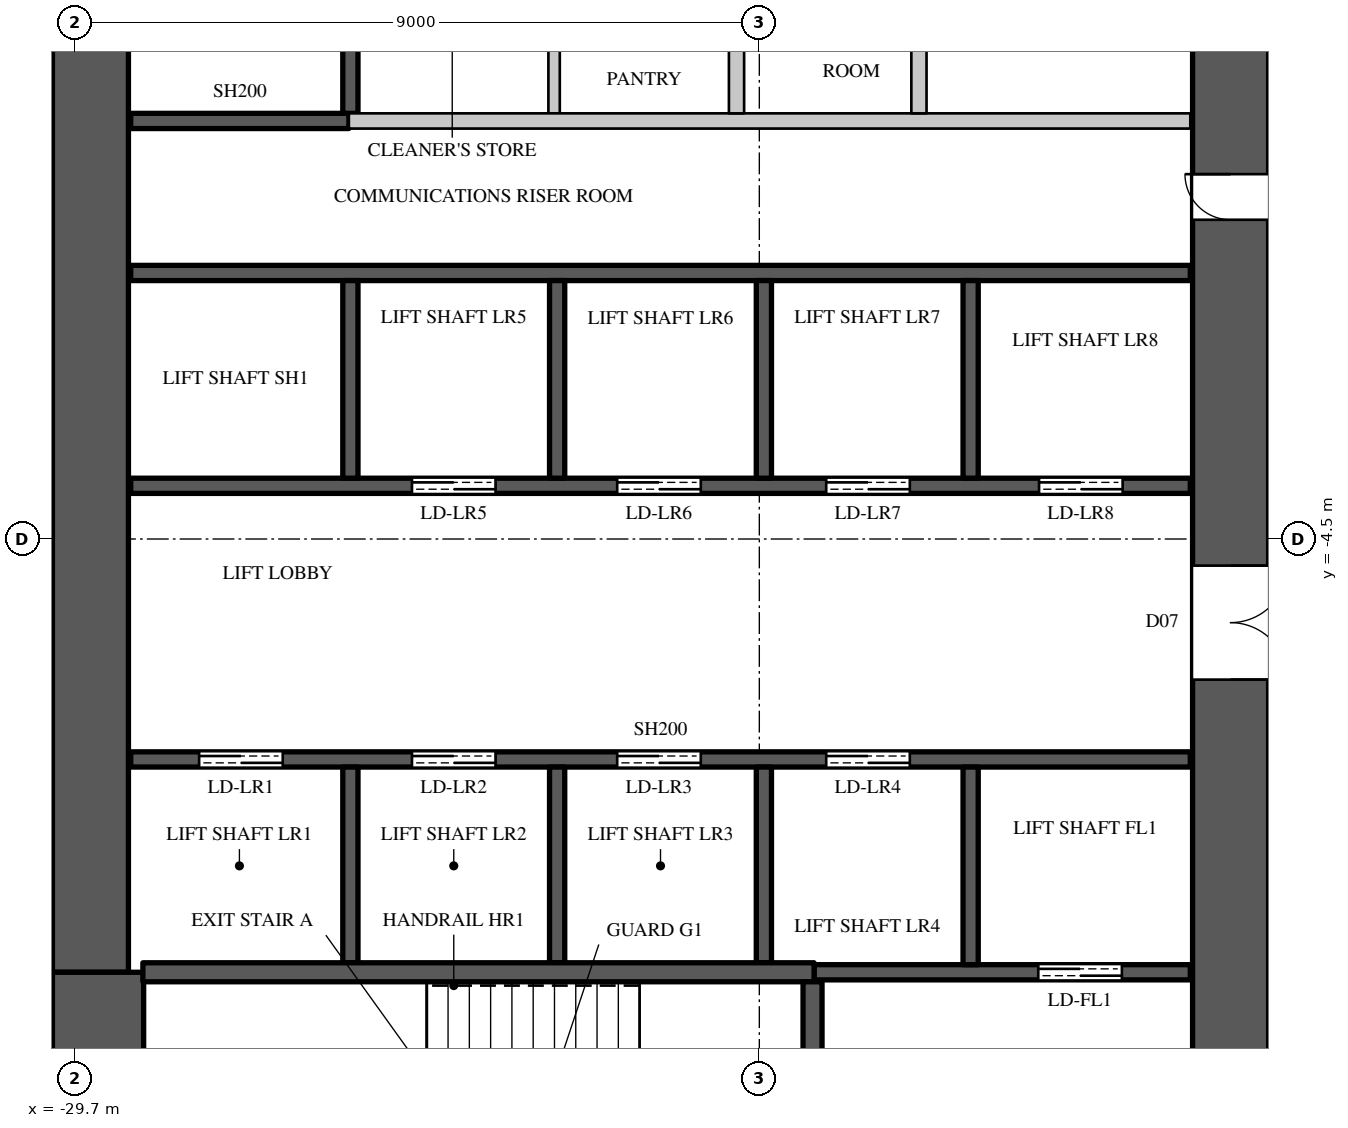
"""IFC4 building model, lengths in metres.
Left out: names, types, materials, properties, quantities, classifications, styles, units other than length and angle.
Written with IfcOpenShell. Run it as: python <this file> out.ifc"""

import sys

from ifc_helpers import new_model, si_unit, direction, frame, frame_2d, origin, place, context, subcontext, project, spatial, rectangle, extrude, element, fill, save


model = new_model("IFC4")
c1 = context("Model", 3, precision=1e-05, world=origin(), true_north=direction((0.0, 1.0)))
c2 = subcontext(c1, "Body", "Model", "MODEL_VIEW")
j1 = project(units=[si_unit("LENGTHUNIT", "METRE"), si_unit("PLANEANGLEUNIT", "RADIAN")], contexts=[c1])
p1 = place(None, origin())
s1 = spatial("IfcSite", under=j1, at=p1, CompositionType="ELEMENT")
p2 = place(p1, origin())
s2 = spatial("IfcBuilding", under=s1, at=p2, CompositionType="ELEMENT")
p3 = place(p2, frame((0.0, 0.0, 77.1)))
s3 = spatial("IfcBuildingStorey", under=s2, at=p3, CompositionType="ELEMENT", Elevation=77.1)
p4 = place(p3, frame((-14.5, -14.8, 0.0), z_axis=(0.0, 0.0, 1.0), x_axis=(0.0, 1.0, 0.0)))
e1 = element("IfcWall", 1, at=p4, inside=s3, PredefinedType="SHEAR", context=c2, shape_type="SweptSolid", body=[
    extrude(rectangle(XDim=29.6, YDim=1.0, at=frame_2d((14.8, 0.0))), origin(), (0.0, 0.0, 1.0), 3.6),
])
p5 = place(p4, frame((8.45, 0.0, 0.0)))
e2 = element("IfcOpeningElement", 2, at=p5, cuts=e1, PredefinedType="OPENING", context=c2, shape_type="SweptSolid", body=[
    extrude(rectangle(XDim=1.5, YDim=2.4, at=frame_2d((0.75, 1.2))), frame((0.0, 0.51, 0.0), z_axis=(0.0, -1.0, 0.0), x_axis=(1.0, 0.0, 0.0)), (0.0, 0.0, 1.0), 1.02),
])
p6 = place(p4, frame((19.65, 0.0, 0.0)))
e3 = element("IfcOpeningElement", 3, at=p6, cuts=e1, PredefinedType="OPENING", context=c2, shape_type="SweptSolid", body=[
    extrude(rectangle(XDim=1.5, YDim=2.4, at=frame_2d((0.75, 1.2))), frame((0.0, 0.51, 0.0), z_axis=(0.0, -1.0, 0.0), x_axis=(1.0, 0.0, 0.0)), (0.0, 0.0, 1.0), 1.02),
])
p7 = place(p4, frame((14.5, 0.0, 0.0)))
e4 = element("IfcOpeningElement", 4, at=p7, cuts=e1, PredefinedType="OPENING", context=c2, shape_type="SweptSolid", body=[
    extrude(rectangle(XDim=0.6, YDim=2.0, at=frame_2d((0.3, 1.0))), frame((0.0, 0.51, 0.0), z_axis=(0.0, -1.0, 0.0), x_axis=(1.0, 0.0, 0.0)), (0.0, 0.0, 1.0), 1.02),
])
p8 = place(p3, frame((-29.5, -10.2, 0.0), z_axis=(0.0, 0.0, 1.0), x_axis=(0.0, 1.0, 0.0)))
e5 = element("IfcWall", 5, at=p8, inside=s3, PredefinedType="SHEAR", context=c2, shape_type="SweptSolid", body=[
    extrude(rectangle(XDim=20.4, YDim=1.0, at=frame_2d((10.2, 0.0))), origin(), (0.0, 0.0, 1.0), 3.6),
])
p9 = place(p3, frame((-29.4, -14.8, 0.0), z_axis=(0.0, 0.0, 1.0), x_axis=(0.0, 1.0, 0.0)))
e6 = element("IfcWall", 6, at=p9, inside=s3, PredefinedType="SHEAR", context=c2, shape_type="SweptSolid", body=[
    extrude(rectangle(XDim=4.6, YDim=1.2, at=frame_2d((2.3, 0.0))), origin(), (0.0, 0.0, 1.0), 3.6),
])
p10 = place(p3, frame((-23.4, 1.1, 0.0), z_axis=(0.0, 0.0, 1.0), x_axis=(0.0, 1.0, 0.0)))
e7 = element("IfcWall", 7, at=p10, inside=s3, PredefinedType="PARTITIONING", context=c2, shape_type="SweptSolid", body=[
    extrude(rectangle(XDim=2.6, YDim=0.15, at=frame_2d((1.3, 0.0))), origin(), (0.0, 0.0, 1.0), 3.3),
])
p11 = place(p3, frame((-26.1, 1.0, 0.0), z_axis=(0.0, 0.0, 1.0), x_axis=(1.0, 0.0, 0.0)))
e8 = element("IfcWall", 8, at=p11, inside=s3, PredefinedType="PARTITIONING", context=c2, shape_type="SweptSolid", body=[
    extrude(rectangle(XDim=11.07, YDim=0.2, at=frame_2d((5.535, 0.0))), origin(), (0.0, 0.0, 1.0), 3.3),
])
for number, where, z_axis, x_axis in (
    (9, (-21.0, 1.1, 0.0), (0.0, 0.0, 1.0), (0.0, 1.0, 0.0)),
    (10, (-18.6, 1.1, 0.0), (0.0, 0.0, 1.0), (0.0, 1.0, 0.0)),
):
    element("IfcWall", number, at=place(p3, frame(where, z_axis=z_axis, x_axis=x_axis)), inside=s3, PredefinedType="PARTITIONING", context=c2, shape_type="SweptSolid", body=[
        extrude(rectangle(XDim=2.6, YDim=0.2, at=frame_2d((1.3, 0.0))), origin(), (0.0, 0.0, 1.0), 3.3),
    ])
p12 = place(p3, frame((-28.97, -7.4, 0.0), z_axis=(0.0, 0.0, 1.0), x_axis=(1.0, 0.0, 0.0)))
e11 = element("IfcWall", 11, at=p12, inside=s3, PredefinedType="SHEAR", context=c2, shape_type="SweptSolid", body=[
    extrude(rectangle(XDim=13.94, YDim=0.2, at=frame_2d((6.97, 0.0))), origin(), (0.0, 0.0, 1.0), 3.3),
])
p13 = place(p12, frame((0.9, 0.0, 0.0)))
e12 = element("IfcOpeningElement", 12, at=p13, cuts=e11, PredefinedType="OPENING", context=c2, shape_type="SweptSolid", body=[
    extrude(rectangle(XDim=1.1, YDim=2.2, at=frame_2d((0.55, 1.1))), frame((0.0, 0.11, 0.0), z_axis=(0.0, -1.0, 0.0), x_axis=(1.0, 0.0, 0.0)), (0.0, 0.0, 1.0), 0.22),
])
p14 = place(p12, frame((3.7, 0.0, 0.0)))
e13 = element("IfcOpeningElement", 13, at=p14, cuts=e11, PredefinedType="OPENING", context=c2, shape_type="SweptSolid", body=[
    extrude(rectangle(XDim=1.1, YDim=2.2, at=frame_2d((0.55, 1.1))), frame((0.0, 0.11, 0.0), z_axis=(0.0, -1.0, 0.0), x_axis=(1.0, 0.0, 0.0)), (0.0, 0.0, 1.0), 0.22),
])
p15 = place(p12, frame((6.4, 0.0, 0.0)))
e14 = element("IfcOpeningElement", 14, at=p15, cuts=e11, PredefinedType="OPENING", context=c2, shape_type="SweptSolid", body=[
    extrude(rectangle(XDim=1.1, YDim=2.2, at=frame_2d((0.55, 1.1))), frame((0.0, 0.11, 0.0), z_axis=(0.0, -1.0, 0.0), x_axis=(1.0, 0.0, 0.0)), (0.0, 0.0, 1.0), 0.22),
])
p16 = place(p12, frame((9.15, 0.0, 0.0)))
e15 = element("IfcOpeningElement", 15, at=p16, cuts=e11, PredefinedType="OPENING", context=c2, shape_type="SweptSolid", body=[
    extrude(rectangle(XDim=1.1, YDim=2.2, at=frame_2d((0.55, 1.1))), frame((0.0, 0.11, 0.0), z_axis=(0.0, -1.0, 0.0), x_axis=(1.0, 0.0, 0.0)), (0.0, 0.0, 1.0), 0.22),
])
p17 = place(p3, frame((-28.97, -3.8, 0.0), z_axis=(0.0, 0.0, 1.0), x_axis=(1.0, 0.0, 0.0)))
e16 = element("IfcWall", 16, at=p17, inside=s3, PredefinedType="SHEAR", context=c2, shape_type="SweptSolid", body=[
    extrude(rectangle(XDim=13.94, YDim=0.2, at=frame_2d((6.97, 0.0))), origin(), (0.0, 0.0, 1.0), 3.3),
])
p18 = place(p17, frame((3.7, 0.0, 0.0)))
e17 = element("IfcOpeningElement", 17, at=p18, cuts=e16, PredefinedType="OPENING", context=c2, shape_type="SweptSolid", body=[
    extrude(rectangle(XDim=1.1, YDim=2.2, at=frame_2d((0.55, 1.1))), frame((0.0, 0.11, 0.0), z_axis=(0.0, -1.0, 0.0), x_axis=(1.0, 0.0, 0.0)), (0.0, 0.0, 1.0), 0.22),
])
p19 = place(p17, frame((6.4, 0.0, 0.0)))
e18 = element("IfcOpeningElement", 18, at=p19, cuts=e16, PredefinedType="OPENING", context=c2, shape_type="SweptSolid", body=[
    extrude(rectangle(XDim=1.1, YDim=2.2, at=frame_2d((0.55, 1.1))), frame((0.0, 0.11, 0.0), z_axis=(0.0, -1.0, 0.0), x_axis=(1.0, 0.0, 0.0)), (0.0, 0.0, 1.0), 0.22),
])
p20 = place(p17, frame((9.15, 0.0, 0.0)))
e19 = element("IfcOpeningElement", 19, at=p20, cuts=e16, PredefinedType="OPENING", context=c2, shape_type="SweptSolid", body=[
    extrude(rectangle(XDim=1.1, YDim=2.2, at=frame_2d((0.55, 1.1))), frame((0.0, 0.11, 0.0), z_axis=(0.0, -1.0, 0.0), x_axis=(1.0, 0.0, 0.0)), (0.0, 0.0, 1.0), 0.22),
])
p21 = place(p17, frame((11.95, 0.0, 0.0)))
e20 = element("IfcOpeningElement", 20, at=p21, cuts=e16, PredefinedType="OPENING", context=c2, shape_type="SweptSolid", body=[
    extrude(rectangle(XDim=1.1, YDim=2.2, at=frame_2d((0.55, 1.1))), frame((0.0, 0.11, 0.0), z_axis=(0.0, -1.0, 0.0), x_axis=(1.0, 0.0, 0.0)), (0.0, 0.0, 1.0), 0.22),
])
p22 = place(p3, frame((-28.97, -1.0, 0.0), z_axis=(0.0, 0.0, 1.0), x_axis=(1.0, 0.0, 0.0)))
e21 = element("IfcWall", 21, at=p22, inside=s3, PredefinedType="SHEAR", context=c2, shape_type="SweptSolid", body=[
    extrude(rectangle(XDim=13.94, YDim=0.2, at=frame_2d((6.97, 0.0))), origin(), (0.0, 0.0, 1.0), 3.3),
])
p23 = place(p3, frame((-28.97, 1.0, 0.0), z_axis=(0.0, 0.0, 1.0), x_axis=(1.0, 0.0, 0.0)))
e22 = element("IfcWall", 22, at=p23, inside=s3, PredefinedType="SHEAR", context=c2, shape_type="SweptSolid", body=[
    extrude(rectangle(XDim=2.87, YDim=0.2, at=frame_2d((1.435, 0.0))), origin(), (0.0, 0.0, 1.0), 3.3),
])
p24 = place(p3, frame((-26.08, -10.075, 0.0), z_axis=(0.0, 0.0, 1.0), x_axis=(0.0, 1.0, 0.0)))
e23 = element("IfcWall", 23, at=p24, inside=s3, PredefinedType="SHEAR", context=c2, shape_type="SweptSolid", body=[
    extrude(rectangle(XDim=2.575, YDim=0.2, at=frame_2d((1.288, 0.0))), origin(), (0.0, 0.0, 1.0), 3.6),
])
p25 = place(p3, frame((-26.08, -3.7, 0.0), z_axis=(0.0, 0.0, 1.0), x_axis=(0.0, 1.0, 0.0)))
e24 = element("IfcWall", 24, at=p25, inside=s3, PredefinedType="SHEAR", context=c2, shape_type="SweptSolid", body=[
    extrude(rectangle(XDim=2.6, YDim=0.2, at=frame_2d((1.3, 0.0))), origin(), (0.0, 0.0, 1.0), 3.6),
])
p26 = place(p3, frame((-26.08, 1.1, 0.0), z_axis=(0.0, 0.0, 1.0), x_axis=(0.0, 1.0, 0.0)))
e25 = element("IfcWall", 25, at=p26, inside=s3, PredefinedType="SHEAR", context=c2, shape_type="SweptSolid", body=[
    extrude(rectangle(XDim=2.6, YDim=0.2, at=frame_2d((1.3, 0.0))), origin(), (0.0, 0.0, 1.0), 3.3),
])
p27 = place(p3, frame((-23.36, -10.075, 0.0), z_axis=(0.0, 0.0, 1.0), x_axis=(0.0, 1.0, 0.0)))
e26 = element("IfcWall", 26, at=p27, inside=s3, PredefinedType="SHEAR", context=c2, shape_type="SweptSolid", body=[
    extrude(rectangle(XDim=2.575, YDim=0.2, at=frame_2d((1.288, 0.0))), origin(), (0.0, 0.0, 1.0), 3.6),
])
p28 = place(p3, frame((-23.36, -3.7, 0.0), z_axis=(0.0, 0.0, 1.0), x_axis=(0.0, 1.0, 0.0)))
e27 = element("IfcWall", 27, at=p28, inside=s3, PredefinedType="SHEAR", context=c2, shape_type="SweptSolid", body=[
    extrude(rectangle(XDim=2.6, YDim=0.2, at=frame_2d((1.3, 0.0))), origin(), (0.0, 0.0, 1.0), 3.6),
])
p29 = place(p3, frame((-20.64, -10.075, 0.0), z_axis=(0.0, 0.0, 1.0), x_axis=(0.0, 1.0, 0.0)))
e28 = element("IfcWall", 28, at=p29, inside=s3, PredefinedType="SHEAR", context=c2, shape_type="SweptSolid", body=[
    extrude(rectangle(XDim=2.575, YDim=0.2, at=frame_2d((1.288, 0.0))), origin(), (0.0, 0.0, 1.0), 3.6),
])
p30 = place(p3, frame((-20.64, -3.7, 0.0), z_axis=(0.0, 0.0, 1.0), x_axis=(0.0, 1.0, 0.0)))
e29 = element("IfcWall", 29, at=p30, inside=s3, PredefinedType="SHEAR", context=c2, shape_type="SweptSolid", body=[
    extrude(rectangle(XDim=2.6, YDim=0.2, at=frame_2d((1.3, 0.0))), origin(), (0.0, 0.0, 1.0), 3.6),
])
p31 = place(p3, frame((-19.98, -10.2, 0.0), z_axis=(0.0, 0.0, 1.0), x_axis=(1.0, 0.0, 0.0)))
e30 = element("IfcWall", 30, at=p31, inside=s3, PredefinedType="SHEAR", context=c2, shape_type="SweptSolid", body=[
    extrude(rectangle(XDim=4.95, YDim=0.2, at=frame_2d((2.475, 0.0))), origin(), (0.0, 0.0, 1.0), 3.3),
])
p32 = place(p31, frame((2.95, 0.0, 0.0)))
e31 = element("IfcOpeningElement", 31, at=p32, cuts=e30, PredefinedType="OPENING", context=c2, shape_type="SweptSolid", body=[
    extrude(rectangle(XDim=1.1, YDim=2.2, at=frame_2d((0.55, 1.1))), frame((0.0, 0.11, 0.0), z_axis=(0.0, -1.0, 0.0), x_axis=(1.0, 0.0, 0.0)), (0.0, 0.0, 1.0), 0.22),
])
p33 = place(p3, frame((-17.92, -10.1, 0.0), z_axis=(0.0, 0.0, 1.0), x_axis=(0.0, 1.0, 0.0)))
e32 = element("IfcWall", 32, at=p33, inside=s3, PredefinedType="SHEAR", context=c2, shape_type="SweptSolid", body=[
    extrude(rectangle(XDim=2.6, YDim=0.2, at=frame_2d((1.3, 0.0))), origin(), (0.0, 0.0, 1.0), 3.6),
])
p34 = place(p3, frame((-17.92, -3.7, 0.0), z_axis=(0.0, 0.0, 1.0), x_axis=(0.0, 1.0, 0.0)))
e33 = element("IfcWall", 33, at=p34, inside=s3, PredefinedType="SHEAR", context=c2, shape_type="SweptSolid", body=[
    extrude(rectangle(XDim=2.6, YDim=0.2, at=frame_2d((1.3, 0.0))), origin(), (0.0, 0.0, 1.0), 3.6),
])
p35 = place(p3, frame((-28.81, -10.2, 0.0), z_axis=(0.0, 0.0, 1.0), x_axis=(1.0, 0.0, 0.0)))
e34 = element("IfcWall", 34, at=p35, inside=s3, PredefinedType="SHEAR", context=c2, shape_type="SweptSolid", body=[
    extrude(rectangle(XDim=8.83, YDim=0.25, at=frame_2d((4.415, 0.0))), origin(), (0.0, 0.0, 1.0), 3.3),
])
p36 = place(p3, frame((-20.0, -14.77, 0.0), z_axis=(0.0, 0.0, 1.0), x_axis=(0.0, 1.0, 0.0)))
e35 = element("IfcWall", 35, at=p36, inside=s3, PredefinedType="SHEAR", context=c2, shape_type="SweptSolid", body=[
    extrude(rectangle(XDim=4.445, YDim=0.25, at=frame_2d((2.223, 0.0))), origin(), (0.0, 0.0, 1.0), 3.3),
])
p37 = place(p36, frame((1.7, 0.0, 0.0)))
e36 = element("IfcOpeningElement", 36, at=p37, cuts=e35, PredefinedType="OPENING", context=c2, shape_type="SweptSolid", body=[
    extrude(rectangle(XDim=1.1, YDim=2.2, at=frame_2d((0.55, 1.1))), frame((0.0, 0.135, 0.0), z_axis=(0.0, -1.0, 0.0), x_axis=(1.0, 0.0, 0.0)), (0.0, 0.0, 1.0), 0.27),
])
p38 = place(p13, origin())
e37 = element("IfcDoor", 37, at=p38, inside=s3, OperationType="DOUBLE_DOOR_SLIDING", PredefinedType="DOOR", context=c2, shape_type="SweptSolid", body=[
    extrude(rectangle(XDim=1.1, YDim=2.2, at=frame_2d((0.55, 1.1))), frame((0.0, 0.025, 0.0), z_axis=(0.0, -1.0, 0.0), x_axis=(1.0, 0.0, 0.0)), (0.0, 0.0, 1.0), 0.05),
])
fill(e12, e37)
p39 = place(p14, origin())
e38 = element("IfcDoor", 38, at=p39, inside=s3, OperationType="DOUBLE_DOOR_SLIDING", PredefinedType="DOOR", context=c2, shape_type="SweptSolid", body=[
    extrude(rectangle(XDim=1.1, YDim=2.2, at=frame_2d((0.55, 1.1))), frame((0.0, 0.025, 0.0), z_axis=(0.0, -1.0, 0.0), x_axis=(1.0, 0.0, 0.0)), (0.0, 0.0, 1.0), 0.05),
])
fill(e13, e38)
p40 = place(p15, origin())
e39 = element("IfcDoor", 39, at=p40, inside=s3, OperationType="DOUBLE_DOOR_SLIDING", PredefinedType="DOOR", context=c2, shape_type="SweptSolid", body=[
    extrude(rectangle(XDim=1.1, YDim=2.2, at=frame_2d((0.55, 1.1))), frame((0.0, 0.025, 0.0), z_axis=(0.0, -1.0, 0.0), x_axis=(1.0, 0.0, 0.0)), (0.0, 0.0, 1.0), 0.05),
])
fill(e14, e39)
p41 = place(p16, origin())
e40 = element("IfcDoor", 40, at=p41, inside=s3, OperationType="DOUBLE_DOOR_SLIDING", PredefinedType="DOOR", context=c2, shape_type="SweptSolid", body=[
    extrude(rectangle(XDim=1.1, YDim=2.2, at=frame_2d((0.55, 1.1))), frame((0.0, 0.025, 0.0), z_axis=(0.0, -1.0, 0.0), x_axis=(1.0, 0.0, 0.0)), (0.0, 0.0, 1.0), 0.05),
])
fill(e15, e40)
p42 = place(p32, origin())
e41 = element("IfcDoor", 41, at=p42, inside=s3, OperationType="DOUBLE_DOOR_SLIDING", PredefinedType="DOOR", context=c2, shape_type="SweptSolid", body=[
    extrude(rectangle(XDim=1.1, YDim=2.2, at=frame_2d((0.55, 1.1))), frame((0.0, 0.025, 0.0), z_axis=(0.0, -1.0, 0.0), x_axis=(1.0, 0.0, 0.0)), (0.0, 0.0, 1.0), 0.05),
])
fill(e31, e41)
p43 = place(p18, origin())
e42 = element("IfcDoor", 42, at=p43, inside=s3, OperationType="DOUBLE_DOOR_SLIDING", PredefinedType="DOOR", context=c2, shape_type="SweptSolid", body=[
    extrude(rectangle(XDim=1.1, YDim=2.2, at=frame_2d((0.55, 1.1))), frame((0.0, 0.025, 0.0), z_axis=(0.0, -1.0, 0.0), x_axis=(1.0, 0.0, 0.0)), (0.0, 0.0, 1.0), 0.05),
])
fill(e17, e42)
p44 = place(p19, origin())
e43 = element("IfcDoor", 43, at=p44, inside=s3, OperationType="DOUBLE_DOOR_SLIDING", PredefinedType="DOOR", context=c2, shape_type="SweptSolid", body=[
    extrude(rectangle(XDim=1.1, YDim=2.2, at=frame_2d((0.55, 1.1))), frame((0.0, 0.025, 0.0), z_axis=(0.0, -1.0, 0.0), x_axis=(1.0, 0.0, 0.0)), (0.0, 0.0, 1.0), 0.05),
])
fill(e18, e43)
p45 = place(p20, origin())
e44 = element("IfcDoor", 44, at=p45, inside=s3, OperationType="DOUBLE_DOOR_SLIDING", PredefinedType="DOOR", context=c2, shape_type="SweptSolid", body=[
    extrude(rectangle(XDim=1.1, YDim=2.2, at=frame_2d((0.55, 1.1))), frame((0.0, 0.025, 0.0), z_axis=(0.0, -1.0, 0.0), x_axis=(1.0, 0.0, 0.0)), (0.0, 0.0, 1.0), 0.05),
])
fill(e19, e44)
p46 = place(p21, origin())
e45 = element("IfcDoor", 45, at=p46, inside=s3, OperationType="DOUBLE_DOOR_SLIDING", PredefinedType="DOOR", context=c2, shape_type="SweptSolid", body=[
    extrude(rectangle(XDim=1.1, YDim=2.2, at=frame_2d((0.55, 1.1))), frame((0.0, 0.025, 0.0), z_axis=(0.0, -1.0, 0.0), x_axis=(1.0, 0.0, 0.0)), (0.0, 0.0, 1.0), 0.05),
])
fill(e20, e45)
p47 = place(p5, origin())
e46 = element("IfcDoor", 46, at=p47, inside=s3, OperationType="DOUBLE_DOOR_SINGLE_SWING", PredefinedType="DOOR", context=c2, shape_type="SweptSolid", body=[
    extrude(rectangle(XDim=1.5, YDim=2.4, at=frame_2d((0.75, 1.2))), frame((0.0, -0.445, 0.0), z_axis=(0.0, -1.0, 0.0), x_axis=(1.0, 0.0, 0.0)), (0.0, 0.0, 1.0), 0.05),
])
fill(e2, e46)
p48 = place(p7, origin())
e47 = element("IfcDoor", 47, at=p48, inside=s3, OperationType="SINGLE_SWING_RIGHT", PredefinedType="DOOR", context=c2, shape_type="SweptSolid", body=[
    extrude(rectangle(XDim=0.6, YDim=2.0, at=frame_2d((0.3, 1.0))), frame((0.0, 0.495, 0.0), z_axis=(0.0, -1.0, 0.0), x_axis=(1.0, 0.0, 0.0)), (0.0, 0.0, 1.0), 0.05),
])
fill(e4, e47)
save(model, sys.argv[1])
